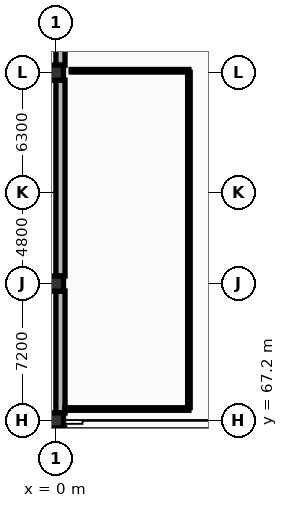
"""IFC4 building model, lengths in metres.
Left out: names, types, materials, properties, quantities, classifications, styles, units other than length and angle.
Written with IfcOpenShell. Run it as: python <this file> out.ifc"""

import sys

from ifc_helpers import new_model, si_unit, direction, frame, frame_2d, origin, origin_2d, place, context, subcontext, project, spatial, rectangle, extrude, element, fill, save


model = new_model("IFC4")
c1 = context("Model", 3, precision=1e-05, world=origin(), true_north=direction((0.0, 1.0)))
c2 = subcontext(c1, "Body", "Model", "MODEL_VIEW")
j1 = project(units=[si_unit("LENGTHUNIT", "METRE"), si_unit("PLANEANGLEUNIT", "RADIAN")], contexts=[c1])
p1 = place(None, origin())
s1 = spatial("IfcSite", under=j1, at=p1, CompositionType="ELEMENT")
p2 = place(p1, origin())
s2 = spatial("IfcBuilding", under=s1, at=p2, CompositionType="ELEMENT")
p3 = place(p2, origin())
s3 = spatial("IfcBuildingStorey", under=s2, at=p3, CompositionType="ELEMENT", Elevation=0.0)
for number, where, z_axis, x_axis in (
    (1, (0.0, 67.2, 0.0), (0.0, 0.0, 1.0), (1.0, 0.0, 0.0)),
    (2, (0.0, 74.4, 0.0), (0.0, 0.0, 1.0), (1.0, 0.0, 0.0)),
    (3, (0.0, 85.5, 0.0), (0.0, 0.0, 1.0), (1.0, 0.0, 0.0)),
):
    element("IfcColumn", number, at=place(p3, frame(where, z_axis=z_axis, x_axis=x_axis)), inside=s3, PredefinedType="COLUMN", context=c2, shape_type="SweptSolid", body=[
        extrude(rectangle(XDim=0.8, YDim=0.8, at=origin_2d()), origin(), (0.0, 0.0, 1.0), 5.4),
    ])
p4 = place(p3, frame((0.24, 67.592, 0.0), z_axis=(0.0, 0.0, 1.0), x_axis=(0.0, 1.0, 0.0)))
e4 = element("IfcWall", 4, at=p4, inside=s3, PredefinedType="STANDARD", context=c2, shape_type="SweptSolid", body=[
    extrude(rectangle(XDim=6.416, YDim=0.48, at=frame_2d((3.208, 0.0))), origin(), (0.0, 0.0, 1.0), 4.28),
])
p5 = place(p4, frame((1.253, 0.0, 0.85)))
e5 = element("IfcOpeningElement", 5, at=p5, cuts=e4, PredefinedType="OPENING", context=c2, shape_type="SweptSolid", body=[
    extrude(rectangle(XDim=1.7, YDim=2.3, at=frame_2d((0.85, 1.15))), frame((0.0, 0.25, 0.0), z_axis=(0.0, -1.0, 0.0), x_axis=(1.0, 0.0, 0.0)), (0.0, 0.0, 1.0), 0.5),
])
p6 = place(p4, frame((3.703, 0.0, 0.85)))
e6 = element("IfcOpeningElement", 6, at=p6, cuts=e4, PredefinedType="OPENING", context=c2, shape_type="SweptSolid", body=[
    extrude(rectangle(XDim=1.7, YDim=2.3, at=frame_2d((0.85, 1.15))), frame((0.0, 0.25, 0.0), z_axis=(0.0, -1.0, 0.0), x_axis=(1.0, 0.0, 0.0)), (0.0, 0.0, 1.0), 0.5),
])
p7 = place(p3, frame((0.24, 74.792, 0.0), z_axis=(0.0, 0.0, 1.0), x_axis=(0.0, 1.0, 0.0)))
e7 = element("IfcWall", 7, at=p7, inside=s3, PredefinedType="STANDARD", context=c2, shape_type="SweptSolid", body=[
    extrude(rectangle(XDim=10.316, YDim=0.48, at=frame_2d((5.158, 0.0))), origin(), (0.0, 0.0, 1.0), 4.23),
])
p8 = place(p7, frame((1.295, 0.0, 0.85)))
e8 = element("IfcOpeningElement", 8, at=p8, cuts=e7, PredefinedType="OPENING", context=c2, shape_type="SweptSolid", body=[
    extrude(rectangle(XDim=1.7, YDim=2.3, at=frame_2d((0.85, 1.15))), frame((0.0, 0.25, 0.0), z_axis=(0.0, -1.0, 0.0), x_axis=(1.0, 0.0, 0.0)), (0.0, 0.0, 1.0), 0.5),
])
p9 = place(p7, frame((4.308, 0.0, 0.85)))
e9 = element("IfcOpeningElement", 9, at=p9, cuts=e7, PredefinedType="OPENING", context=c2, shape_type="SweptSolid", body=[
    extrude(rectangle(XDim=1.7, YDim=2.3, at=frame_2d((0.85, 1.15))), frame((0.0, 0.25, 0.0), z_axis=(0.0, -1.0, 0.0), x_axis=(1.0, 0.0, 0.0)), (0.0, 0.0, 1.0), 0.5),
])
p10 = place(p7, frame((7.321, 0.0, 0.85)))
e10 = element("IfcOpeningElement", 10, at=p10, cuts=e7, PredefinedType="OPENING", context=c2, shape_type="SweptSolid", body=[
    extrude(rectangle(XDim=1.7, YDim=2.3, at=frame_2d((0.85, 1.15))), frame((0.0, 0.25, 0.0), z_axis=(0.0, -1.0, 0.0), x_axis=(1.0, 0.0, 0.0)), (0.0, 0.0, 1.0), 0.5),
])
p11 = place(p3, frame((0.24, 85.892, 0.0), z_axis=(0.0, 0.0, 1.0), x_axis=(0.0, 1.0, 0.0)))
e11 = element("IfcWall", 11, at=p11, inside=s3, PredefinedType="STANDARD", context=c2, shape_type="SweptSolid", body=[
    extrude(rectangle(XDim=11.816, YDim=0.48, at=frame_2d((5.908, 0.0))), origin(), (0.0, 0.0, 1.0), 4.18),
])
p12 = place(p11, frame((0.988, 0.0, 0.0)))
e12 = element("IfcOpeningElement", 12, at=p12, cuts=e11, PredefinedType="OPENING", context=c2, shape_type="SweptSolid", body=[
    extrude(rectangle(XDim=1.8, YDim=2.25, at=frame_2d((0.9, 1.125))), frame((0.0, 0.25, 0.0), z_axis=(0.0, -1.0, 0.0), x_axis=(1.0, 0.0, 0.0)), (0.0, 0.0, 1.0), 0.5),
])
p13 = place(p3, frame((0.24, 56.742, 0.0), z_axis=(0.0, 0.0, 1.0), x_axis=(0.0, 1.0, 0.0)))
e13 = element("IfcWall", 13, at=p13, inside=s3, PredefinedType="STANDARD", context=c2, shape_type="SweptSolid", body=[
    extrude(rectangle(XDim=10.066, YDim=0.44, at=frame_2d((5.033, 0.0))), origin(), (0.0, 0.0, 1.0), 4.28),
])
p14 = place(p13, frame((1.508, 0.0, 0.9)))
e14 = element("IfcOpeningElement", 14, at=p14, cuts=e13, PredefinedType="OPENING", context=c2, shape_type="SweptSolid", body=[
    extrude(rectangle(XDim=1.3, YDim=2.1, at=frame_2d((0.65, 1.05))), frame((0.0, 0.23, 0.0), z_axis=(0.0, -1.0, 0.0), x_axis=(1.0, 0.0, 0.0)), (0.0, 0.0, 1.0), 0.46),
])
p15 = place(p13, frame((4.408, 0.0, 0.9)))
e15 = element("IfcOpeningElement", 15, at=p15, cuts=e13, PredefinedType="OPENING", context=c2, shape_type="SweptSolid", body=[
    extrude(rectangle(XDim=1.3, YDim=2.1, at=frame_2d((0.65, 1.05))), frame((0.0, 0.23, 0.0), z_axis=(0.0, -1.0, 0.0), x_axis=(1.0, 0.0, 0.0)), (0.0, 0.0, 1.0), 0.46),
])
p16 = place(p13, frame((7.308, 0.0, 0.9)))
e16 = element("IfcOpeningElement", 16, at=p16, cuts=e13, PredefinedType="OPENING", context=c2, shape_type="SweptSolid", body=[
    extrude(rectangle(XDim=1.3, YDim=2.1, at=frame_2d((0.65, 1.05))), frame((0.0, 0.23, 0.0), z_axis=(0.0, -1.0, 0.0), x_axis=(1.0, 0.0, 0.0)), (0.0, 0.0, 1.0), 0.46),
])
p17 = place(p3, frame((0.8, 85.6, 0.0), z_axis=(0.0, 0.0, 1.0), x_axis=(1.0, 0.0, 0.0)))
e17 = element("IfcWall", 17, at=p17, inside=s3, PredefinedType="PARTITIONING", context=c2, shape_type="SweptSolid", body=[
    extrude(rectangle(XDim=6.2, YDim=0.135, at=frame_2d((3.1, 0.0))), origin(), (0.0, 0.0, 1.0), 4.33),
])
p18 = place(p17, frame((2.17, 0.0, 0.0)))
e18 = element("IfcOpeningElement", 18, at=p18, cuts=e17, PredefinedType="OPENING", context=c2, shape_type="SweptSolid", body=[
    extrude(rectangle(XDim=0.95, YDim=2.15, at=frame_2d((0.475, 1.075))), frame((0.0, 0.077, 0.0), z_axis=(0.0, -1.0, 0.0), x_axis=(1.0, 0.0, 0.0)), (0.0, 0.0, 1.0), 0.155),
])
p19 = place(p3, frame((7.0, 67.8, 0.0), z_axis=(0.0, 0.0, 1.0), x_axis=(-1.0, 0.0, 0.0)))
e19 = element("IfcWall", 19, at=p19, inside=s3, PredefinedType="PARTITIONING", context=c2, shape_type="SweptSolid", body=[
    extrude(rectangle(XDim=6.526, YDim=0.135, at=frame_2d((3.263, 0.0))), origin(), (0.0, 0.0, 1.0), 5.125),
])
p20 = place(p3, frame((7.0, 85.522, 0.0), z_axis=(0.0, 0.0, 1.0), x_axis=(0.0, -1.0, 0.0)))
e20 = element("IfcWall", 20, at=p20, inside=s3, PredefinedType="PARTITIONING", context=c2, shape_type="SweptSolid", body=[
    extrude(rectangle(XDim=17.645, YDim=0.135, at=frame_2d((8.823, 0.0))), origin(), (0.0, 0.0, 1.0), 4.33),
])
p21 = place(p5, origin())
e21 = element("IfcWindow", 21, at=p21, inside=s3, PartitioningType="SINGLE_PANEL", PredefinedType="WINDOW", context=c2, shape_type="SweptSolid", body=[
    extrude(rectangle(XDim=1.7, YDim=2.3, at=frame_2d((0.85, 1.15))), frame((0.0, 0.03, 0.0), z_axis=(0.0, -1.0, 0.0), x_axis=(1.0, 0.0, 0.0)), (0.0, 0.0, 1.0), 0.06),
])
fill(e5, e21)
p22 = place(p6, origin())
e22 = element("IfcWindow", 22, at=p22, inside=s3, PartitioningType="SINGLE_PANEL", PredefinedType="WINDOW", context=c2, shape_type="SweptSolid", body=[
    extrude(rectangle(XDim=1.7, YDim=2.3, at=frame_2d((0.85, 1.15))), frame((0.0, 0.03, 0.0), z_axis=(0.0, -1.0, 0.0), x_axis=(1.0, 0.0, 0.0)), (0.0, 0.0, 1.0), 0.06),
])
fill(e6, e22)
p23 = place(p8, origin())
e23 = element("IfcWindow", 23, at=p23, inside=s3, PartitioningType="SINGLE_PANEL", PredefinedType="WINDOW", context=c2, shape_type="SweptSolid", body=[
    extrude(rectangle(XDim=1.7, YDim=2.3, at=frame_2d((0.85, 1.15))), frame((0.0, 0.03, 0.0), z_axis=(0.0, -1.0, 0.0), x_axis=(1.0, 0.0, 0.0)), (0.0, 0.0, 1.0), 0.06),
])
fill(e8, e23)
p24 = place(p9, origin())
e24 = element("IfcWindow", 24, at=p24, inside=s3, PartitioningType="SINGLE_PANEL", PredefinedType="WINDOW", context=c2, shape_type="SweptSolid", body=[
    extrude(rectangle(XDim=1.7, YDim=2.3, at=frame_2d((0.85, 1.15))), frame((0.0, 0.03, 0.0), z_axis=(0.0, -1.0, 0.0), x_axis=(1.0, 0.0, 0.0)), (0.0, 0.0, 1.0), 0.06),
])
fill(e9, e24)
p25 = place(p10, origin())
e25 = element("IfcWindow", 25, at=p25, inside=s3, PartitioningType="SINGLE_PANEL", PredefinedType="WINDOW", context=c2, shape_type="SweptSolid", body=[
    extrude(rectangle(XDim=1.7, YDim=2.3, at=frame_2d((0.85, 1.15))), frame((0.0, 0.03, 0.0), z_axis=(0.0, -1.0, 0.0), x_axis=(1.0, 0.0, 0.0)), (0.0, 0.0, 1.0), 0.06),
])
fill(e10, e25)
p26 = place(p18, origin())
e26 = element("IfcDoor", 26, at=p26, inside=s3, OperationType="SINGLE_SWING_RIGHT", PredefinedType="DOOR", context=c2, shape_type="SweptSolid", body=[
    extrude(rectangle(XDim=0.95, YDim=2.15, at=frame_2d((0.475, 1.075))), frame((0.0, 0.025, 0.0), z_axis=(0.0, -1.0, 0.0), x_axis=(1.0, 0.0, 0.0)), (0.0, 0.0, 1.0), 0.05),
])
fill(e18, e26)
save(model, sys.argv[1])
